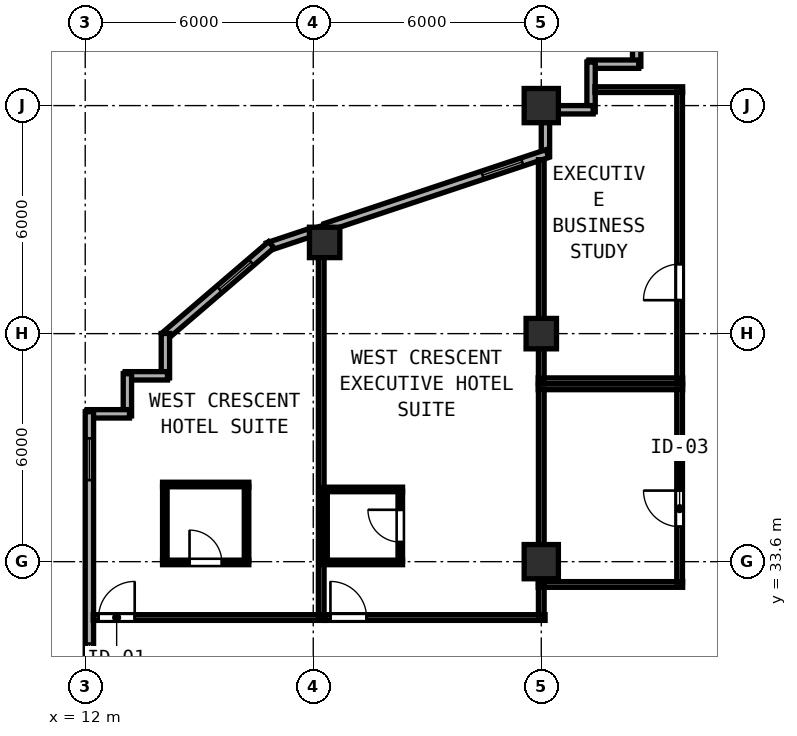
"""IFC4 building model, lengths in metres.
Left out: names, types, materials, properties, quantities, classifications, styles, units other than length and angle.
Written with IfcOpenShell. Run it as: python <this file> out.ifc"""

import sys

from ifc_helpers import new_model, si_unit, direction, frame, frame_2d, origin, origin_2d, place, context, subcontext, project, spatial, rectangle, hollow_rectangle, extrude, element, fill, save


model = new_model("IFC4")
c1 = context("Model", 3, precision=1e-05, world=origin(), true_north=direction((0.0, 1.0)))
c2 = subcontext(c1, "Body", "Model", "MODEL_VIEW")
j1 = project(units=[si_unit("LENGTHUNIT", "METRE"), si_unit("PLANEANGLEUNIT", "RADIAN")], contexts=[c1])
p1 = place(None, origin())
s1 = spatial("IfcSite", under=j1, at=p1, CompositionType="ELEMENT")
p2 = place(p1, origin())
s2 = spatial("IfcBuilding", under=s1, at=p2, CompositionType="ELEMENT")
p3 = place(p2, frame((0.0, 0.0, 169.0)))
s3 = spatial("IfcBuildingStorey", under=s2, at=p3, CompositionType="ELEMENT", Elevation=169.0)
for number, where, z_axis, x_axis in (
    (1, (24.0, 33.6, 0.0), (0.0, 0.0, 1.0), (1.0, 0.0, 0.0)),
    (2, (24.0, 45.6, 0.0), (0.0, 0.0, 1.0), (1.0, 0.0, 0.0)),
):
    element("IfcColumn", number, at=place(p3, frame(where, z_axis=z_axis, x_axis=x_axis)), inside=s3, PredefinedType="COLUMN", context=c2, shape_type="SweptSolid", body=[
        extrude(hollow_rectangle(XDim=0.9, YDim=0.9, WallThickness=0.034, at=origin_2d()), origin(), (0.0, 0.0, 1.0), 3.8),
    ])
for number, where, z_axis, x_axis in (
    (3, (24.0, 39.6, 0.0), (0.0, 0.0, 1.0), (1.0, 0.0, 0.0)),
    (4, (18.3, 42.0, 0.0), (0.0, 0.0, 1.0), (1.0, 0.0, 0.0)),
):
    element("IfcColumn", number, at=place(p3, frame(where, z_axis=z_axis, x_axis=x_axis)), inside=s3, PredefinedType="COLUMN", context=c2, shape_type="SweptSolid", body=[
        extrude(hollow_rectangle(XDim=0.8, YDim=0.8, WallThickness=0.03, at=origin_2d()), origin(), (0.0, 0.0, 1.0), 3.8),
    ])
p4 = place(p3, frame((26.51, 48.0, 0.0), z_axis=(0.0, 0.0, 1.0), x_axis=(0.0, -1.0, 0.0)))
e5 = element("IfcWall", 5, at=p4, inside=s3, PredefinedType="SOLIDWALL", context=c2, shape_type="SweptSolid", body=[
    extrude(rectangle(XDim=1.365, YDim=0.22, at=frame_2d((0.683, 0.0))), origin(), (0.0, 0.0, 1.0), 3.62),
])
for number, where, z_axis, x_axis in (
    (6, (26.565, 46.69, 0.0), (0.0, 0.0, 1.0), (-1.0, 0.0, 0.0)),
    (7, (25.31, 46.745, 0.0), (0.0, 0.0, 1.0), (0.0, -1.0, 0.0)),
):
    element("IfcWall", number, at=place(p3, frame(where, z_axis=z_axis, x_axis=x_axis)), inside=s3, PredefinedType="SOLIDWALL", context=c2, shape_type="SweptSolid", body=[
        extrude(rectangle(XDim=1.31, YDim=0.22, at=frame_2d((0.655, 0.0))), origin(), (0.0, 0.0, 1.0), 3.62),
    ])
p5 = place(p3, frame((25.365, 45.49, 0.0), z_axis=(0.0, 0.0, 1.0), x_axis=(-1.0, 0.0, 0.0)))
e8 = element("IfcWall", 8, at=p5, inside=s3, PredefinedType="SOLIDWALL", context=c2, shape_type="SweptSolid", body=[
    extrude(rectangle(XDim=0.923, YDim=0.22, at=frame_2d((0.461, 0.0))), origin(), (0.0, 0.0, 1.0), 3.62),
])
p6 = place(p3, frame((24.11, 45.158, 0.0), z_axis=(0.0, 0.0, 1.0), x_axis=(0.0, -1.0, 0.0)))
e9 = element("IfcWall", 9, at=p6, inside=s3, PredefinedType="SOLIDWALL", context=c2, shape_type="SweptSolid", body=[
    extrude(rectangle(XDim=0.892, YDim=0.22, at=frame_2d((0.446, 0.0))), origin(), (0.0, 0.0, 1.0), 3.215),
])
p7 = place(p3, frame((24.162, 44.338, 0.0), z_axis=(0.0, 0.0, 1.0), x_axis=(-0.948687265055, -0.316215864755, 0.0)))
e10 = element("IfcWall", 10, at=p7, inside=s3, PredefinedType="SOLIDWALL", context=c2, shape_type="SweptSolid", body=[
    extrude(rectangle(XDim=6.154, YDim=0.22, at=frame_2d((3.077, 0.0))), origin(), (0.0, 0.0, 1.0), 3.215),
])
p8 = place(p7, frame((0.7, 0.0, 0.85)))
e11 = element("IfcOpeningElement", 11, at=p8, cuts=e10, PredefinedType="OPENING", context=c2, shape_type="SweptSolid", body=[
    extrude(rectangle(XDim=1.1, YDim=1.75, at=frame_2d((0.55, 0.875))), frame((0.0, 0.12, 0.0), z_axis=(0.0, -1.0, 0.0), x_axis=(1.0, 0.0, 0.0)), (0.0, 0.0, 1.0), 0.24),
])
p9 = place(p3, frame((17.908, 42.253, 0.0), z_axis=(0.0, 0.0, 1.0), x_axis=(-0.948662335685, -0.316290646166, 0.0)))
e12 = element("IfcWall", 12, at=p9, inside=s3, PredefinedType="SOLIDWALL", context=c2, shape_type="SweptSolid", body=[
    extrude(rectangle(XDim=1.165, YDim=0.22, at=frame_2d((0.583, 0.0))), origin(), (0.0, 0.0, 1.0), 3.62),
])
p10 = place(p3, frame((16.897, 41.938, 0.0), z_axis=(0.0, 0.0, 1.0), x_axis=(-0.759279729622, -0.650764390686, 0.0)))
e13 = element("IfcWall", 13, at=p10, inside=s3, PredefinedType="SOLIDWALL", context=c2, shape_type="SweptSolid", body=[
    extrude(rectangle(XDim=3.726, YDim=0.22, at=frame_2d((1.863, 0.0))), origin(), (0.0, 0.0, 1.0), 3.62),
])
p11 = place(p10, frame((0.7, 0.0, 0.85)))
e14 = element("IfcOpeningElement", 14, at=p11, cuts=e13, PredefinedType="OPENING", context=c2, shape_type="SweptSolid", body=[
    extrude(rectangle(XDim=1.1, YDim=1.75, at=frame_2d((0.55, 0.875))), frame((0.0, 0.12, 0.0), z_axis=(0.0, -1.0, 0.0), x_axis=(1.0, 0.0, 0.0)), (0.0, 0.0, 1.0), 0.24),
])
p12 = place(p3, frame((14.11, 39.604, 0.0), z_axis=(0.0, 0.0, 1.0), x_axis=(0.0, -1.0, 0.0)))
e15 = element("IfcWall", 15, at=p12, inside=s3, PredefinedType="SOLIDWALL", context=c2, shape_type="SweptSolid", body=[
    extrude(rectangle(XDim=1.169, YDim=0.22, at=frame_2d((0.585, 0.0))), origin(), (0.0, 0.0, 1.0), 3.62),
])
p13 = place(p3, frame((14.165, 38.49, 0.0), z_axis=(0.0, 0.0, 1.0), x_axis=(-1.0, 0.0, 0.0)))
e16 = element("IfcWall", 16, at=p13, inside=s3, PredefinedType="SOLIDWALL", context=c2, shape_type="SweptSolid", body=[
    extrude(rectangle(XDim=1.11, YDim=0.22, at=frame_2d((0.555, 0.0))), origin(), (0.0, 0.0, 1.0), 3.62),
])
p14 = place(p3, frame((13.11, 38.545, 0.0), z_axis=(0.0, 0.0, 1.0), x_axis=(0.0, -1.0, 0.0)))
e17 = element("IfcWall", 17, at=p14, inside=s3, PredefinedType="SOLIDWALL", context=c2, shape_type="SweptSolid", body=[
    extrude(rectangle(XDim=1.11, YDim=0.22, at=frame_2d((0.555, 0.0))), origin(), (0.0, 0.0, 1.0), 3.62),
])
p15 = place(p3, frame((13.165, 37.49, 0.0), z_axis=(0.0, 0.0, 1.0), x_axis=(-1.0, 0.0, 0.0)))
e18 = element("IfcWall", 18, at=p15, inside=s3, PredefinedType="SOLIDWALL", context=c2, shape_type="SweptSolid", body=[
    extrude(rectangle(XDim=1.11, YDim=0.22, at=frame_2d((0.555, 0.0))), origin(), (0.0, 0.0, 1.0), 3.62),
])
p16 = place(p3, frame((12.11, 37.545, 0.0), z_axis=(0.0, 0.0, 1.0), x_axis=(0.0, -1.0, 0.0)))
e19 = element("IfcWall", 19, at=p16, inside=s3, PredefinedType="SOLIDWALL", context=c2, shape_type="SweptSolid", body=[
    extrude(rectangle(XDim=21.145, YDim=0.22, at=frame_2d((10.573, 0.0))), origin(), (0.0, 0.0, 1.0), 3.62),
])
p17 = place(p16, frame((0.7, 0.0, 0.85)))
e20 = element("IfcOpeningElement", 20, at=p17, cuts=e19, PredefinedType="OPENING", context=c2, shape_type="SweptSolid", body=[
    extrude(rectangle(XDim=1.1, YDim=1.75, at=frame_2d((0.55, 0.875))), frame((0.0, 0.12, 0.0), z_axis=(0.0, -1.0, 0.0), x_axis=(1.0, 0.0, 0.0)), (0.0, 0.0, 1.0), 0.24),
])
p18 = place(p16, frame((6.1, 0.0, 0.85)))
e21 = element("IfcOpeningElement", 21, at=p18, cuts=e19, PredefinedType="OPENING", context=c2, shape_type="SweptSolid", body=[
    extrude(rectangle(XDim=1.1, YDim=1.75, at=frame_2d((0.55, 0.875))), frame((0.0, 0.12, 0.0), z_axis=(0.0, -1.0, 0.0), x_axis=(1.0, 0.0, 0.0)), (0.0, 0.0, 1.0), 0.24),
])
p19 = place(p16, frame((11.5, 0.0, 0.85)))
e22 = element("IfcOpeningElement", 22, at=p19, cuts=e19, PredefinedType="OPENING", context=c2, shape_type="SweptSolid", body=[
    extrude(rectangle(XDim=1.1, YDim=1.75, at=frame_2d((0.55, 0.875))), frame((0.0, 0.12, 0.0), z_axis=(0.0, -1.0, 0.0), x_axis=(1.0, 0.0, 0.0)), (0.0, 0.0, 1.0), 0.24),
])
p20 = place(p16, frame((16.9, 0.0, 0.85)))
e23 = element("IfcOpeningElement", 23, at=p20, cuts=e19, PredefinedType="OPENING", context=c2, shape_type="SweptSolid", body=[
    extrude(rectangle(XDim=1.1, YDim=1.75, at=frame_2d((0.55, 0.875))), frame((0.0, 0.12, 0.0), z_axis=(0.0, -1.0, 0.0), x_axis=(1.0, 0.0, 0.0)), (0.0, 0.0, 1.0), 0.24),
])
for number, where, z_axis, x_axis in (
    (24, (23.92, 38.2, 0.0), (0.0, 0.0, 1.0), (1.0, 0.0, 0.0)),
    (25, (23.92, 33.0, 0.0), (0.0, 0.0, 1.0), (1.0, 0.0, 0.0)),
):
    element("IfcWall", number, at=place(p3, frame(where, z_axis=z_axis, x_axis=x_axis)), inside=s3, PredefinedType="PARTITIONING", context=c2, shape_type="SweptSolid", body=[
        extrude(rectangle(XDim=3.8, YDim=0.15, at=frame_2d((1.9, 0.0))), origin(), (0.0, 0.0, 1.0), 3.62),
    ])
p21 = place(p3, frame((24.0, 33.06, 0.0), z_axis=(0.0, 0.0, 1.0), x_axis=(0.0, 1.0, 0.0)))
e26 = element("IfcWall", 26, at=p21, inside=s3, PredefinedType="PARTITIONING", context=c2, shape_type="SweptSolid", body=[
    extrude(rectangle(XDim=5.08, YDim=0.15, at=frame_2d((2.54, 0.0))), origin(), (0.0, 0.0, 1.0), 3.215),
])
p22 = place(p3, frame((27.64, 33.06, 0.0), z_axis=(0.0, 0.0, 1.0), x_axis=(0.0, 1.0, 0.0)))
e27 = element("IfcWall", 27, at=p22, inside=s3, PredefinedType="PARTITIONING", context=c2, shape_type="SweptSolid", body=[
    extrude(rectangle(XDim=5.08, YDim=0.15, at=frame_2d((2.54, 0.0))), origin(), (0.0, 0.0, 1.0), 3.62),
])
p23 = place(p22, frame((2.41, 0.0, 0.0), z_axis=(0.0, 0.0, 1.0), x_axis=(-1.0, 0.0, 0.0)))
e28 = element("IfcOpeningElement", 28, at=p23, cuts=e27, PredefinedType="OPENING", context=c2, shape_type="SweptSolid", body=[
    extrude(rectangle(XDim=0.95, YDim=2.12, at=frame_2d((0.475, 1.06))), frame((0.0, 0.085, 0.0), z_axis=(0.0, -1.0, 0.0), x_axis=(1.0, 0.0, 0.0)), (0.0, 0.0, 1.0), 0.17),
])
p24 = place(p3, frame((25.412, 46.02, 0.0), z_axis=(0.0, 0.0, 1.0), x_axis=(1.0, 0.0, 0.0)))
e29 = element("IfcWall", 29, at=p24, inside=s3, PredefinedType="PARTITIONING", context=c2, shape_type="SweptSolid", body=[
    extrude(rectangle(XDim=2.308, YDim=0.15, at=frame_2d((1.154, 0.0))), origin(), (0.0, 0.0, 1.0), 3.62),
])
p25 = place(p3, frame((23.92, 38.36, 0.0), z_axis=(0.0, 0.0, 1.0), x_axis=(1.0, 0.0, 0.0)))
e30 = element("IfcWall", 30, at=p25, inside=s3, PredefinedType="PARTITIONING", context=c2, shape_type="SweptSolid", body=[
    extrude(rectangle(XDim=3.8, YDim=0.15, at=frame_2d((1.9, 0.0))), origin(), (0.0, 0.0, 1.0), 3.62),
])
p26 = place(p3, frame((24.0, 38.42, 0.0), z_axis=(0.0, 0.0, 1.0), x_axis=(0.0, 1.0, 0.0)))
e31 = element("IfcWall", 31, at=p26, inside=s3, PredefinedType="PARTITIONING", context=c2, shape_type="SweptSolid", body=[
    extrude(rectangle(XDim=5.757, YDim=0.15, at=frame_2d((2.878, 0.0))), origin(), (0.0, 0.0, 1.0), 3.215),
])
p27 = place(p3, frame((27.64, 38.42, 0.0), z_axis=(0.0, 0.0, 1.0), x_axis=(0.0, 1.0, 0.0)))
e32 = element("IfcWall", 32, at=p27, inside=s3, PredefinedType="PARTITIONING", context=c2, shape_type="SweptSolid", body=[
    extrude(rectangle(XDim=7.54, YDim=0.15, at=frame_2d((3.77, 0.0))), origin(), (0.0, 0.0, 1.0), 3.62),
])
p28 = place(p27, frame((3.01, 0.0, 0.0), z_axis=(0.0, 0.0, 1.0), x_axis=(-1.0, 0.0, 0.0)))
e33 = element("IfcOpeningElement", 33, at=p28, cuts=e32, PredefinedType="OPENING", context=c2, shape_type="SweptSolid", body=[
    extrude(rectangle(XDim=0.95, YDim=2.12, at=frame_2d((0.475, 1.06))), frame((0.0, 0.085, 0.0), z_axis=(0.0, -1.0, 0.0), x_axis=(1.0, 0.0, 0.0)), (0.0, 0.0, 1.0), 0.17),
])
p29 = place(p3, frame((12.212, 32.13, 0.0), z_axis=(0.0, 0.0, 1.0), x_axis=(1.0, 0.0, 0.0)))
e34 = element("IfcWall", 34, at=p29, inside=s3, PredefinedType="PARTITIONING", context=c2, shape_type="SweptSolid", body=[
    extrude(rectangle(XDim=6.098, YDim=0.15, at=frame_2d((3.049, 0.0))), origin(), (0.0, 0.0, 1.0), 3.62),
])
p30 = place(p29, frame((0.14, 0.0, 0.0)))
e35 = element("IfcOpeningElement", 35, at=p30, cuts=e34, PredefinedType="OPENING", context=c2, shape_type="SweptSolid", body=[
    extrude(rectangle(XDim=0.95, YDim=2.18, at=frame_2d((0.475, 1.09))), frame((0.0, 0.085, 0.0), z_axis=(0.0, -1.0, 0.0), x_axis=(1.0, 0.0, 0.0)), (0.0, 0.0, 1.0), 0.17),
])
p31 = place(p3, frame((18.21, 32.19, 0.0), z_axis=(0.0, 0.0, 1.0), x_axis=(0.0, 1.0, 0.0)))
e36 = element("IfcWall", 36, at=p31, inside=s3, PredefinedType="PARTITIONING", context=c2, shape_type="SweptSolid", body=[
    extrude(rectangle(XDim=10.057, YDim=0.15, at=frame_2d((5.028, 0.0))), origin(), (0.0, 0.0, 1.0), 3.62),
])
p32 = place(p3, frame((14.035, 35.63, 0.0), z_axis=(0.0, 0.0, 1.0), x_axis=(1.0, 0.0, 0.0)))
e37 = element("IfcWall", 37, at=p32, inside=s3, PredefinedType="PARTITIONING", context=c2, shape_type="SweptSolid", body=[
    extrude(rectangle(XDim=2.27, YDim=0.12, at=frame_2d((1.135, 0.0))), origin(), (0.0, 0.0, 1.0), 3.62),
])
p33 = place(p3, frame((14.035, 33.58, 0.0), z_axis=(0.0, 0.0, 1.0), x_axis=(1.0, 0.0, 0.0)))
e38 = element("IfcWall", 38, at=p33, inside=s3, PredefinedType="PARTITIONING", context=c2, shape_type="SweptSolid", body=[
    extrude(rectangle(XDim=2.27, YDim=0.12, at=frame_2d((1.135, 0.0))), origin(), (0.0, 0.0, 1.0), 3.62),
])
p34 = place(p33, frame((0.71, 0.0, 0.0)))
e39 = element("IfcOpeningElement", 39, at=p34, cuts=e38, PredefinedType="OPENING", context=c2, shape_type="SweptSolid", body=[
    extrude(rectangle(XDim=0.85, YDim=2.1, at=frame_2d((0.425, 1.05))), frame((0.0, 0.07, 0.0), z_axis=(0.0, -1.0, 0.0), x_axis=(1.0, 0.0, 0.0)), (0.0, 0.0, 1.0), 0.14),
])
for number, where, z_axis, x_axis in (
    (40, (14.095, 33.625, 0.0), (0.0, 0.0, 1.0), (0.0, 1.0, 0.0)),
    (41, (16.245, 33.625, 0.0), (0.0, 0.0, 1.0), (0.0, 1.0, 0.0)),
):
    element("IfcWall", number, at=place(p3, frame(where, z_axis=z_axis, x_axis=x_axis)), inside=s3, PredefinedType="PARTITIONING", context=c2, shape_type="SweptSolid", body=[
        extrude(rectangle(XDim=1.96, YDim=0.12, at=frame_2d((0.98, 0.0))), origin(), (0.0, 0.0, 1.0), 3.62),
    ])
p35 = place(p3, frame((18.312, 32.13, 0.0), z_axis=(0.0, 0.0, 1.0), x_axis=(1.0, 0.0, 0.0)))
e42 = element("IfcWall", 42, at=p35, inside=s3, PredefinedType="PARTITIONING", context=c2, shape_type="SweptSolid", body=[
    extrude(rectangle(XDim=5.788, YDim=0.15, at=frame_2d((2.894, 0.0))), origin(), (0.0, 0.0, 1.0), 3.62),
])
p36 = place(p35, frame((0.14, 0.0, 0.0)))
e43 = element("IfcOpeningElement", 43, at=p36, cuts=e42, PredefinedType="OPENING", context=c2, shape_type="SweptSolid", body=[
    extrude(rectangle(XDim=0.95, YDim=2.18, at=frame_2d((0.475, 1.09))), frame((0.0, 0.085, 0.0), z_axis=(0.0, -1.0, 0.0), x_axis=(1.0, 0.0, 0.0)), (0.0, 0.0, 1.0), 0.17),
])
p37 = place(p3, frame((24.0, 32.19, 0.0), z_axis=(0.0, 0.0, 1.0), x_axis=(0.0, 1.0, 0.0)))
e44 = element("IfcWall", 44, at=p37, inside=s3, PredefinedType="PARTITIONING", context=c2, shape_type="SweptSolid", body=[
    extrude(rectangle(XDim=0.75, YDim=0.15, at=frame_2d((0.375, 0.0))), origin(), (0.0, 0.0, 1.0), 3.215),
])
for number, where, z_axis, x_axis in (
    (45, (18.27, 35.5, 0.0), (0.0, 0.0, 1.0), (1.0, 0.0, 0.0)),
    (46, (18.27, 33.58, 0.0), (0.0, 0.0, 1.0), (1.0, 0.0, 0.0)),
):
    element("IfcWall", number, at=place(p3, frame(where, z_axis=z_axis, x_axis=x_axis)), inside=s3, PredefinedType="PARTITIONING", context=c2, shape_type="SweptSolid", body=[
        extrude(rectangle(XDim=2.08, YDim=0.12, at=frame_2d((1.04, 0.0))), origin(), (0.0, 0.0, 1.0), 3.62),
    ])
p38 = place(p3, frame((18.31, 33.625, 0.0), z_axis=(0.0, 0.0, 1.0), x_axis=(0.0, 1.0, 0.0)))
e47 = element("IfcWall", 47, at=p38, inside=s3, PredefinedType="PARTITIONING", context=c2, shape_type="SweptSolid", body=[
    extrude(rectangle(XDim=1.83, YDim=0.12, at=frame_2d((0.915, 0.0))), origin(), (0.0, 0.0, 1.0), 3.62),
])
p39 = place(p3, frame((20.29, 33.625, 0.0), z_axis=(0.0, 0.0, 1.0), x_axis=(0.0, 1.0, 0.0)))
e48 = element("IfcWall", 48, at=p39, inside=s3, PredefinedType="PARTITIONING", context=c2, shape_type="SweptSolid", body=[
    extrude(rectangle(XDim=1.83, YDim=0.12, at=frame_2d((0.915, 0.0))), origin(), (0.0, 0.0, 1.0), 3.62),
])
p40 = place(p39, frame((0.49, 0.0, 0.0)))
e49 = element("IfcOpeningElement", 49, at=p40, cuts=e48, PredefinedType="OPENING", context=c2, shape_type="SweptSolid", body=[
    extrude(rectangle(XDim=0.85, YDim=2.1, at=frame_2d((0.425, 1.05))), frame((0.0, 0.07, 0.0), z_axis=(0.0, -1.0, 0.0), x_axis=(1.0, 0.0, 0.0)), (0.0, 0.0, 1.0), 0.14),
])
p41 = place(p8, origin())
e50 = element("IfcWindow", 50, at=p41, inside=s3, PartitioningType="SINGLE_PANEL", PredefinedType="WINDOW", context=c2, shape_type="SweptSolid", body=[
    extrude(rectangle(XDim=1.1, YDim=1.75, at=frame_2d((0.55, 0.875))), frame((0.0, 0.03, 0.0), z_axis=(0.0, -1.0, 0.0), x_axis=(1.0, 0.0, 0.0)), (0.0, 0.0, 1.0), 0.06),
])
fill(e11, e50)
p42 = place(p11, origin())
e51 = element("IfcWindow", 51, at=p42, inside=s3, PartitioningType="SINGLE_PANEL", PredefinedType="WINDOW", context=c2, shape_type="SweptSolid", body=[
    extrude(rectangle(XDim=1.1, YDim=1.75, at=frame_2d((0.55, 0.875))), frame((0.0, 0.03, 0.0), z_axis=(0.0, -1.0, 0.0), x_axis=(1.0, 0.0, 0.0)), (0.0, 0.0, 1.0), 0.06),
])
fill(e14, e51)
p43 = place(p17, origin())
e52 = element("IfcWindow", 52, at=p43, inside=s3, PartitioningType="SINGLE_PANEL", PredefinedType="WINDOW", context=c2, shape_type="SweptSolid", body=[
    extrude(rectangle(XDim=1.1, YDim=1.75, at=frame_2d((0.55, 0.875))), frame((0.0, 0.03, 0.0), z_axis=(0.0, -1.0, 0.0), x_axis=(1.0, 0.0, 0.0)), (0.0, 0.0, 1.0), 0.06),
])
fill(e20, e52)
p44 = place(p18, origin())
e53 = element("IfcWindow", 53, at=p44, inside=s3, PartitioningType="SINGLE_PANEL", PredefinedType="WINDOW", context=c2, shape_type="SweptSolid", body=[
    extrude(rectangle(XDim=1.1, YDim=1.75, at=frame_2d((0.55, 0.875))), frame((0.0, 0.03, 0.0), z_axis=(0.0, -1.0, 0.0), x_axis=(1.0, 0.0, 0.0)), (0.0, 0.0, 1.0), 0.06),
])
fill(e21, e53)
p45 = place(p23, origin())
e54 = element("IfcDoor", 54, at=p45, inside=s3, OperationType="SINGLE_SWING_LEFT", PredefinedType="DOOR", context=c2, shape_type="SweptSolid", body=[
    extrude(rectangle(XDim=0.95, YDim=2.12, at=frame_2d((0.475, 1.06))), frame((0.0, 0.025, 0.0), z_axis=(0.0, -1.0, 0.0), x_axis=(1.0, 0.0, 0.0)), (0.0, 0.0, 1.0), 0.05),
])
fill(e28, e54)
p46 = place(p28, origin())
e55 = element("IfcDoor", 55, at=p46, inside=s3, OperationType="SINGLE_SWING_RIGHT", PredefinedType="DOOR", context=c2, shape_type="SweptSolid", body=[
    extrude(rectangle(XDim=0.95, YDim=2.12, at=frame_2d((0.475, 1.06))), frame((0.0, 0.025, 0.0), z_axis=(0.0, -1.0, 0.0), x_axis=(1.0, 0.0, 0.0)), (0.0, 0.0, 1.0), 0.05),
])
fill(e33, e55)
p47 = place(p30, origin())
e56 = element("IfcDoor", 56, at=p47, inside=s3, OperationType="SINGLE_SWING_RIGHT", PredefinedType="DOOR", context=c2, shape_type="SweptSolid", body=[
    extrude(rectangle(XDim=0.95, YDim=2.18, at=frame_2d((0.475, 1.09))), frame((0.0, 0.025, 0.0), z_axis=(0.0, -1.0, 0.0), x_axis=(1.0, 0.0, 0.0)), (0.0, 0.0, 1.0), 0.05),
])
fill(e35, e56)
p48 = place(p34, origin())
e57 = element("IfcDoor", 57, at=p48, inside=s3, OperationType="SINGLE_SWING_LEFT", PredefinedType="DOOR", context=c2, shape_type="SweptSolid", body=[
    extrude(rectangle(XDim=0.85, YDim=2.1, at=frame_2d((0.425, 1.05))), frame((0.0, 0.025, 0.0), z_axis=(0.0, -1.0, 0.0), x_axis=(1.0, 0.0, 0.0)), (0.0, 0.0, 1.0), 0.05),
])
fill(e39, e57)
p49 = place(p36, origin())
e58 = element("IfcDoor", 58, at=p49, inside=s3, OperationType="SINGLE_SWING_LEFT", PredefinedType="DOOR", context=c2, shape_type="SweptSolid", body=[
    extrude(rectangle(XDim=0.95, YDim=2.18, at=frame_2d((0.475, 1.09))), frame((0.0, 0.025, 0.0), z_axis=(0.0, -1.0, 0.0), x_axis=(1.0, 0.0, 0.0)), (0.0, 0.0, 1.0), 0.05),
])
fill(e43, e58)
p50 = place(p40, origin())
e59 = element("IfcDoor", 59, at=p50, inside=s3, OperationType="SINGLE_SWING_RIGHT", PredefinedType="DOOR", context=c2, shape_type="SweptSolid", body=[
    extrude(rectangle(XDim=0.85, YDim=2.1, at=frame_2d((0.425, 1.05))), frame((0.0, 0.025, 0.0), z_axis=(0.0, -1.0, 0.0), x_axis=(1.0, 0.0, 0.0)), (0.0, 0.0, 1.0), 0.05),
])
fill(e49, e59)
save(model, sys.argv[1])
